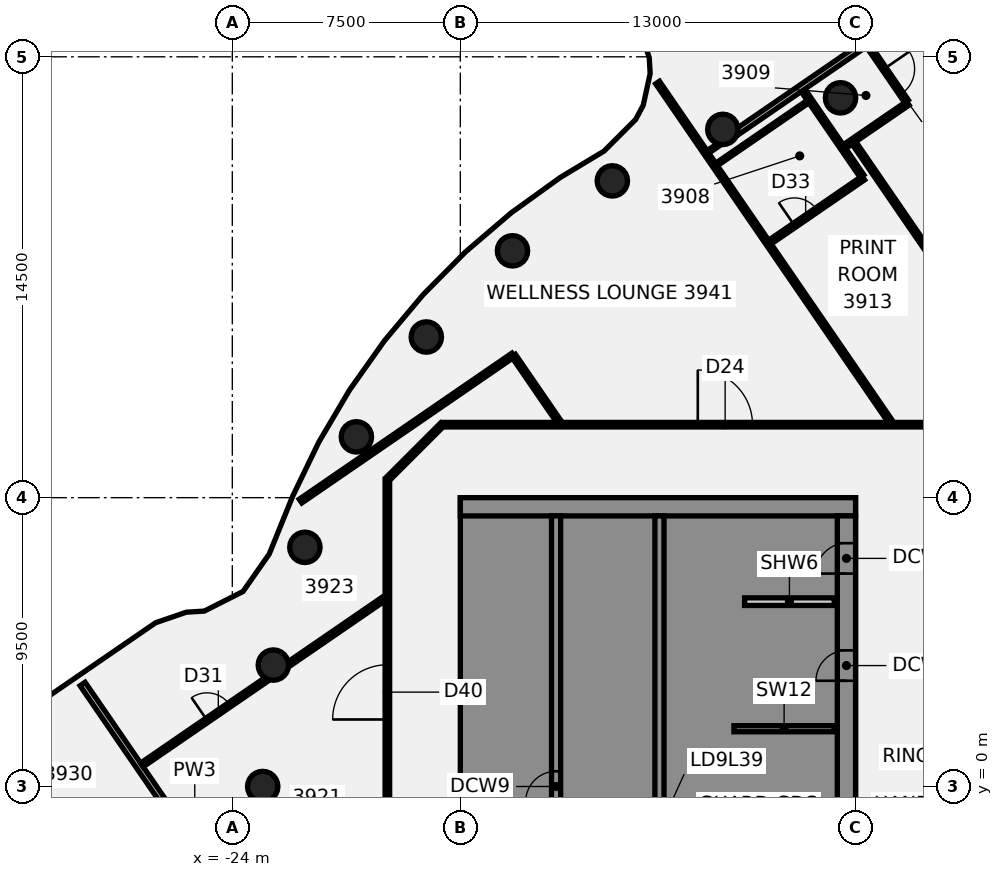
"""IFC4 building model, lengths in metres.
Left out: names, types, materials, properties, quantities, classifications, styles, units other than length and angle.
Written with IfcOpenShell. Run it as: python <this file> out.ifc"""

import sys

from ifc_helpers import new_model, si_unit, direction, frame, frame_2d, origin, origin_2d, place, context, subcontext, project, spatial, polyline, rectangle, circle, outline, extrude, element, fill, save


model = new_model("IFC4")
c1 = context("Model", 3, precision=1e-05, world=origin(), true_north=direction((0.0, 1.0)))
c2 = subcontext(c1, "Body", "Model", "MODEL_VIEW")
j1 = project(units=[si_unit("LENGTHUNIT", "METRE"), si_unit("PLANEANGLEUNIT", "RADIAN")], contexts=[c1])
p1 = place(None, origin())
s1 = spatial("IfcSite", under=j1, at=p1, CompositionType="ELEMENT")
p2 = place(p1, origin())
s2 = spatial("IfcBuilding", under=s1, at=p2, CompositionType="ELEMENT")
p3 = place(p2, frame((0.0, 0.0, 159.25)))
s3 = spatial("IfcBuildingStorey", under=s2, at=p3, CompositionType="ELEMENT", Elevation=159.25)
for number, where, z_axis, x_axis in (
    (1, (-3.994, 22.651, -0.14), (0.0, 0.0, 1.0), (1.0, 0.0, 0.0)),
    (2, (-7.866, 21.613, -0.14), (0.0, 0.0, 1.0), (1.0, 0.0, 0.0)),
    (3, (-11.5, 19.919, -0.14), (0.0, 0.0, 1.0), (1.0, 0.0, 0.0)),
    (4, (-14.784, 17.619, -0.14), (0.0, 0.0, 1.0), (1.0, 0.0, 0.0)),
    (5, (-17.619, 14.784, -0.14), (0.0, 0.0, 1.0), (1.0, 0.0, 0.0)),
    (6, (-19.919, 11.5, -0.14), (0.0, 0.0, 1.0), (1.0, 0.0, 0.0)),
    (7, (-21.613, 7.866, -0.14), (0.0, 0.0, 1.0), (1.0, 0.0, 0.0)),
    (8, (-22.651, 3.994, -0.14), (0.0, 0.0, 1.0), (1.0, 0.0, 0.0)),
    (9, (-23.0, 0.0, -0.14), (0.0, 0.0, 1.0), (1.0, 0.0, 0.0)),
):
    element("IfcColumn", number, at=place(p3, frame(where, z_axis=z_axis, x_axis=x_axis)), inside=s3, PredefinedType="COLUMN", context=c2, shape_type="SweptSolid", body=[
        extrude(circle(Radius=0.5, at=origin_2d()), origin(), (0.0, 0.0, 1.0), 3.75),
    ])
p4 = place(p3, frame((-28.925, 3.371, 0.0), z_axis=(0.0, 0.0, 1.0), x_axis=(0.566012012603, -0.82439699271, 0.0)))
e10 = element("IfcWall", 10, at=p4, inside=s3, PredefinedType="PARTITIONING", context=c2, shape_type="SweptSolid", body=[
    extrude(rectangle(XDim=13.034, YDim=0.2, at=frame_2d((6.517, 0.0))), origin(), (0.0, 0.0, 1.0), 3.01),
])
p5 = place(p4, frame((6.099, 0.0, 0.0)))
e11 = element("IfcOpeningElement", 11, at=p5, cuts=e10, PredefinedType="OPENING", context=c2, shape_type="SweptSolid", body=[
    extrude(rectangle(XDim=1.4, YDim=2.1, at=frame_2d((0.7, 1.05))), frame((0.0, 0.11, 0.0), z_axis=(0.0, -1.0, 0.0), x_axis=(1.0, 0.0, 0.0)), (0.0, 0.0, 1.0), 0.22),
])
p6 = place(p3, frame((-14.751, 14.174, 0.0), z_axis=(0.0, 0.0, 1.0), x_axis=(0.566198904707, -0.824268645715, 0.0)))
e12 = element("IfcWall", 12, at=p6, inside=s3, PredefinedType="PARTITIONING", context=c2, shape_type="SweptSolid", body=[
    extrude(rectangle(XDim=2.638, YDim=0.15, at=frame_2d((1.319, 0.0))), origin(), (0.0, 0.0, 1.0), 3.01),
])
p7 = place(p3, frame((-13.285, 39.225, 0.0), z_axis=(0.0, 0.0, 1.0), x_axis=(0.566080388425, -0.824350043271, 0.0)))
e13 = element("IfcWall", 13, at=p7, inside=s3, PredefinedType="PARTITIONING", context=c2, shape_type="SweptSolid", body=[
    extrude(rectangle(XDim=20.244, YDim=0.15, at=frame_2d((10.122, 0.0))), origin(), (0.0, 0.0, 1.0), 3.01),
])
p8 = place(p7, frame((18.95, 0.0, 0.0)))
e14 = element("IfcOpeningElement", 14, at=p8, cuts=e13, PredefinedType="OPENING", context=c2, shape_type="SweptSolid", body=[
    extrude(rectangle(XDim=1.0, YDim=2.1, at=frame_2d((0.5, 1.05))), frame((0.0, 0.085, 0.0), z_axis=(0.0, -1.0, 0.0), x_axis=(1.0, 0.0, 0.0)), (0.0, 0.0, 1.0), 0.17),
])
p9 = place(p7, frame((8.769, 0.0, 0.0)))
e15 = element("IfcOpeningElement", 15, at=p9, cuts=e13, PredefinedType="OPENING", context=c2, shape_type="SweptSolid", body=[
    extrude(rectangle(XDim=0.9, YDim=2.1, at=frame_2d((0.45, 1.05))), frame((0.0, 0.085, 0.0), z_axis=(0.0, -1.0, 0.0), x_axis=(1.0, 0.0, 0.0)), (0.0, 0.0, 1.0), 0.17),
])
p10 = place(p7, frame((2.32, 0.0, 0.0)))
e16 = element("IfcOpeningElement", 16, at=p10, cuts=e13, PredefinedType="OPENING", context=c2, shape_type="SweptSolid", body=[
    extrude(rectangle(XDim=0.9, YDim=2.1, at=frame_2d((0.45, 1.05))), frame((0.0, 0.085, 0.0), z_axis=(0.0, -1.0, 0.0), x_axis=(1.0, 0.0, 0.0)), (0.0, 0.0, 1.0), 0.17),
])
p11 = place(p3, frame((-10.012, 23.154, 0.0), z_axis=(0.0, 0.0, 1.0), x_axis=(0.566093064015, -0.824341338812, 0.0)))
e17 = element("IfcWall", 17, at=p11, inside=s3, PredefinedType="PARTITIONING", context=c2, shape_type="SweptSolid", body=[
    extrude(rectangle(XDim=13.532, YDim=0.15, at=frame_2d((6.766, 0.0))), origin(), (0.0, 0.0, 1.0), 3.01),
])
p12 = place(p3, frame((-5.227, 22.899, 0.0), z_axis=(0.0, 0.0, 1.0), x_axis=(0.566114247823, -0.824326791031, 0.0)))
e18 = element("IfcWall", 18, at=p12, inside=s3, PredefinedType="PARTITIONING", context=c2, shape_type="SweptSolid", body=[
    extrude(rectangle(XDim=3.425, YDim=0.15, at=frame_2d((1.712, 0.0))), origin(), (0.0, 0.0, 1.0), 3.01),
])
p13 = place(p3, frame((-3.55, 21.163, 0.0), z_axis=(0.0, 0.0, 1.0), x_axis=(0.566071104364, -0.824356418549, 0.0)))
e19 = element("IfcWall", 19, at=p13, inside=s3, PredefinedType="PARTITIONING", context=c2, shape_type="SweptSolid", body=[
    extrude(rectangle(XDim=11.117, YDim=0.15, at=frame_2d((5.559, 0.0))), origin(), (0.0, 0.0, 1.0), 3.01),
])
p14 = place(p13, frame((6.67, 0.0, 0.0)))
e20 = element("IfcOpeningElement", 20, at=p14, cuts=e19, PredefinedType="OPENING", context=c2, shape_type="SweptSolid", body=[
    extrude(rectangle(XDim=0.9, YDim=2.1, at=frame_2d((0.45, 1.05))), frame((0.0, 0.085, 0.0), z_axis=(0.0, -1.0, 0.0), x_axis=(1.0, 0.0, 0.0)), (0.0, 0.0, 1.0), 0.17),
])
p15 = place(p3, frame((-17.065, 11.9, 0.0), z_axis=(0.0, 0.0, 1.0), x_axis=(1.0, 0.0, 0.0)))
e21 = element("IfcWall", 21, at=p15, inside=s3, PredefinedType="PARTITIONING", context=c2, shape_type="SweptSolid", body=[
    extrude(rectangle(XDim=34.165, YDim=0.15, at=frame_2d((17.083, 0.0))), origin(), (0.0, 0.0, 1.0), 3.01),
])
p16 = place(p15, frame((22.576, 0.0, 0.0)))
e22 = element("IfcOpeningElement", 22, at=p16, cuts=e21, PredefinedType="OPENING", context=c2, shape_type="SweptSolid", body=[
    extrude(rectangle(XDim=1.8, YDim=2.1, at=frame_2d((0.9, 1.05))), frame((0.0, 0.085, 0.0), z_axis=(0.0, -1.0, 0.0), x_axis=(1.0, 0.0, 0.0)), (0.0, 0.0, 1.0), 0.17),
])
p17 = place(p15, frame((28.888, 0.0, 0.0)))
e23 = element("IfcOpeningElement", 23, at=p17, cuts=e21, PredefinedType="OPENING", context=c2, shape_type="SweptSolid", body=[
    extrude(rectangle(XDim=1.8, YDim=2.1, at=frame_2d((0.9, 1.05))), frame((0.0, 0.085, 0.0), z_axis=(0.0, -1.0, 0.0), x_axis=(1.0, 0.0, 0.0)), (0.0, 0.0, 1.0), 0.17),
])
p18 = place(p15, frame((8.376, 0.0, 0.0)))
e24 = element("IfcOpeningElement", 24, at=p18, cuts=e21, PredefinedType="OPENING", context=c2, shape_type="SweptSolid", body=[
    extrude(rectangle(XDim=1.8, YDim=2.1, at=frame_2d((0.9, 1.05))), frame((0.0, 0.085, 0.0), z_axis=(0.0, -1.0, 0.0), x_axis=(1.0, 0.0, 0.0)), (0.0, 0.0, 1.0), 0.17),
])
p19 = place(p3, frame((-26.975, 0.708, 0.0), z_axis=(0.0, 0.0, 1.0), x_axis=(0.824360979783, 0.566064461887, 0.0)))
e25 = element("IfcWall", 25, at=p19, inside=s3, PredefinedType="PARTITIONING", context=c2, shape_type="SweptSolid", body=[
    extrude(rectangle(XDim=4.999, YDim=0.15, at=frame_2d((2.5, 0.0))), origin(), (0.0, 0.0, 1.0), 3.01),
])
p20 = place(p19, frame((2.6, 0.0, 0.0)))
e26 = element("IfcOpeningElement", 26, at=p20, cuts=e25, PredefinedType="OPENING", context=c2, shape_type="SweptSolid", body=[
    extrude(rectangle(XDim=0.9, YDim=2.1, at=frame_2d((0.45, 1.05))), frame((0.0, 0.085, 0.0), z_axis=(0.0, -1.0, 0.0), x_axis=(1.0, 0.0, 0.0)), (0.0, 0.0, 1.0), 0.17),
])
p21 = place(p3, frame((-22.148, 4.023, 0.0), z_axis=(0.0, 0.0, 1.0), x_axis=(0.824392319221, 0.566018819484, 0.0)))
e27 = element("IfcWall", 27, at=p21, inside=s3, PredefinedType="PARTITIONING", context=c2, shape_type="SweptSolid", body=[
    extrude(rectangle(XDim=3.82, YDim=0.15, at=frame_2d((1.91, 0.0))), origin(), (0.0, 0.0, 1.0), 3.01),
])
p22 = place(p3, frame((-21.756, 9.387, 0.0), z_axis=(0.0, 0.0, 1.0), x_axis=(0.824352472228, 0.56607685126, 0.0)))
e28 = element("IfcWall", 28, at=p22, inside=s3, PredefinedType="PARTITIONING", context=c2, shape_type="SweptSolid", body=[
    extrude(rectangle(XDim=8.484, YDim=0.15, at=frame_2d((4.242, 0.0))), origin(), (0.0, 0.0, 1.0), 3.01),
])
p23 = place(p3, frame((-8.071, 20.46, 0.0), z_axis=(0.0, 0.0, 1.0), x_axis=(0.824324831047, 0.566117101773, 0.0)))
e29 = element("IfcWall", 29, at=p23, inside=s3, PredefinedType="PARTITIONING", context=c2, shape_type="SweptSolid", body=[
    extrude(rectangle(XDim=3.65, YDim=0.1, at=frame_2d((1.825, 0.0))), origin(), (0.0, 0.0, 1.0), 3.01),
])
p24 = place(p3, frame((-6.312, 17.908, 0.0), z_axis=(0.0, 0.0, 1.0), x_axis=(0.824306135323, 0.566144323711, 0.0)))
e30 = element("IfcWall", 30, at=p24, inside=s3, PredefinedType="PARTITIONING", context=c2, shape_type="SweptSolid", body=[
    extrude(rectangle(XDim=3.719, YDim=0.15, at=frame_2d((1.86, 0.0))), origin(), (0.0, 0.0, 1.0), 3.01),
])
p25 = place(p24, frame((0.97, 0.0, 0.0)))
e31 = element("IfcOpeningElement", 31, at=p25, cuts=e30, PredefinedType="OPENING", context=c2, shape_type="SweptSolid", body=[
    extrude(rectangle(XDim=0.9, YDim=2.1, at=frame_2d((0.45, 1.05))), frame((0.0, 0.085, 0.0), z_axis=(0.0, -1.0, 0.0), x_axis=(1.0, 0.0, 0.0)), (0.0, 0.0, 1.0), 0.17),
])
p26 = place(p3, frame((-8.354, 20.873, 0.0), z_axis=(0.0, 0.0, 1.0), x_axis=(0.824315547904, 0.566130618748, 0.0)))
e32 = element("IfcWall", 32, at=p26, inside=s3, PredefinedType="PARTITIONING", context=c2, shape_type="SweptSolid", body=[
    extrude(rectangle(XDim=0.599, YDim=0.1, at=frame_2d((0.299, 0.0))), origin(), (0.0, 0.0, 1.0), 3.01),
])
p27 = place(p3, frame((-7.49, 21.466, 0.0), z_axis=(0.0, 0.0, 1.0), x_axis=(0.824395355521, 0.566014397162, 0.0)))
e33 = element("IfcWall", 33, at=p27, inside=s3, PredefinedType="PARTITIONING", context=c2, shape_type="SweptSolid", body=[
    extrude(rectangle(XDim=13.176, YDim=0.2, at=frame_2d((6.588, 0.0))), origin(), (0.0, 0.0, 1.0), 3.01),
])
p28 = place(p27, frame((5.576, 0.0, 0.0)))
e34 = element("IfcOpeningElement", 34, at=p28, cuts=e33, PredefinedType="OPENING", context=c2, shape_type="SweptSolid", body=[
    extrude(rectangle(XDim=1.4, YDim=2.1, at=frame_2d((0.7, 1.05))), frame((0.0, 0.11, 0.0), z_axis=(0.0, -1.0, 0.0), x_axis=(1.0, 0.0, 0.0)), (0.0, 0.0, 1.0), 0.22),
])
p29 = place(p3, frame((-3.859, 21.048, 0.0), z_axis=(0.0, 0.0, 1.0), x_axis=(0.825038611489, 0.565076357276, 0.0)))
e35 = element("IfcWall", 35, at=p29, inside=s3, PredefinedType="PARTITIONING", context=c2, shape_type="SweptSolid", body=[
    extrude(rectangle(XDim=2.52, YDim=0.15, at=frame_2d((1.26, 0.0))), origin(), (0.0, 0.0, 1.0), 3.01),
])
p30 = place(p3, frame((-18.872, 10.128, 0.0), z_axis=(0.0, 0.0, 1.0), x_axis=(0.707106781187, 0.707106781187, 0.0)))
e36 = element("IfcWall", 36, at=p30, inside=s3, PredefinedType="PARTITIONING", context=c2, shape_type="SweptSolid", body=[
    extrude(rectangle(XDim=2.505, YDim=0.15, at=frame_2d((1.253, 0.0))), origin(), (0.0, 0.0, 1.0), 3.01),
])
p31 = place(p3, frame((-18.9, -10.1, 0.0), z_axis=(0.0, 0.0, 1.0), x_axis=(0.0, 1.0, 0.0)))
e37 = element("IfcWall", 37, at=p31, inside=s3, PredefinedType="PARTITIONING", context=c2, shape_type="SweptSolid", body=[
    extrude(rectangle(XDim=20.2, YDim=0.15, at=frame_2d((10.1, 0.0))), origin(), (0.0, 0.0, 1.0), 3.01),
])
p32 = place(p31, frame((12.304, 0.0, 0.0)))
e38 = element("IfcOpeningElement", 38, at=p32, cuts=e37, PredefinedType="OPENING", context=c2, shape_type="SweptSolid", body=[
    extrude(rectangle(XDim=1.8, YDim=2.1, at=frame_2d((0.9, 1.05))), frame((0.0, 0.085, 0.0), z_axis=(0.0, -1.0, 0.0), x_axis=(1.0, 0.0, 0.0)), (0.0, 0.0, 1.0), 0.17),
])
p33 = place(p31, frame((4.209, 0.0, 0.0)))
e39 = element("IfcOpeningElement", 39, at=p33, cuts=e37, PredefinedType="OPENING", context=c2, shape_type="SweptSolid", body=[
    extrude(rectangle(XDim=1.8, YDim=2.1, at=frame_2d((0.9, 1.05))), frame((0.0, 0.085, 0.0), z_axis=(0.0, -1.0, 0.0), x_axis=(1.0, 0.0, 0.0)), (0.0, 0.0, 1.0), 0.17),
])
p34 = place(p3, origin())
e40 = element("IfcWall", 40, at=p34, inside=s3, PredefinedType="SHEAR", context=c2, shape_type="SweptSolid", body=[
    extrude(outline(polyline([(-13.5, -8.125), (-15.9, -8.125), (-15.9, -5.625), (-13.5, -5.625), (-13.5, -5.375), (-15.9, -5.375), (-15.9, 5.375), (-13.5, 5.375), (-13.5, 5.625), (-15.9, 5.625), (-15.9, 8.125), (-13.5, 8.125), (-13.5, 8.9), (-15.9, 8.9), (-16.5, 8.9), (-16.5, -8.9), (-15.9, -8.9), (-13.5, -8.9), (-13.5, -8.125)])), origin(), (0.0, 0.0, 1.0), 3.61),
])
p35 = place(p3, frame((-16.5, 9.2, 0.0), z_axis=(0.0, 0.0, 1.0), x_axis=(1.0, 0.0, 0.0)))
e41 = element("IfcWall", 41, at=p35, inside=s3, PredefinedType="SHEAR", context=c2, shape_type="SweptSolid", body=[
    extrude(rectangle(XDim=13.0, YDim=0.6, at=frame_2d((6.5, 0.0))), origin(), (0.0, 0.0, 1.0), 3.61),
])
p36 = place(p3, origin())
e42 = element("IfcWall", 42, at=p36, inside=s3, PredefinedType="SHEAR", context=c2, shape_type="SweptSolid", body=[
    extrude(outline(polyline([(-9.8, -5.375), (-9.8, -5.625), (-7.5, -5.625), (-7.2, -5.625), (-7.2, 8.9), (-7.5, 8.9), (-9.8, 8.9), (-9.8, 8.125), (-7.5, 8.125), (-7.5, 5.625), (-9.8, 5.625), (-9.8, 5.375), (-7.5, 5.375), (-7.5, 2.875), (-9.8, 2.875), (-9.8, 2.625), (-7.5, 2.625), (-7.5, 0.125), (-9.8, 0.125), (-9.8, -0.125), (-7.5, -0.125), (-7.5, -2.625), (-9.8, -2.625), (-9.8, -2.875), (-7.5, -2.875), (-7.5, -5.375), (-9.8, -5.375)])), origin(), (0.0, 0.0, 1.0), 3.61),
])
p37 = place(p3, frame((-7.5, 1.9, 0.0), z_axis=(0.0, 0.0, 1.0), x_axis=(1.0, 0.0, 0.0)))
e43 = element("IfcWall", 43, at=p37, inside=s3, PredefinedType="SHEAR", context=c2, shape_type="SweptSolid", body=[
    extrude(rectangle(XDim=3.3, YDim=0.2, at=frame_2d((1.65, 0.0))), origin(), (0.0, 0.0, 1.0), 3.61),
])
p38 = place(p3, frame((-13.35, -8.9, 0.0), z_axis=(0.0, 0.0, 1.0), x_axis=(0.0, 1.0, 0.0)))
e44 = element("IfcWall", 44, at=p38, inside=s3, PredefinedType="SHEAR", context=c2, shape_type="SweptSolid", body=[
    extrude(rectangle(XDim=17.8, YDim=0.3, at=frame_2d((8.9, 0.0))), origin(), (0.0, 0.0, 1.0), 3.61),
])
p39 = place(p38, frame((1.325, 0.0, 0.0)))
e45 = element("IfcOpeningElement", 45, at=p39, cuts=e44, PredefinedType="OPENING", context=c2, shape_type="SweptSolid", body=[
    extrude(rectangle(XDim=1.4, YDim=2.1, at=frame_2d((0.7, 1.05))), frame((0.0, 0.16, 0.0), z_axis=(0.0, -1.0, 0.0), x_axis=(1.0, 0.0, 0.0)), (0.0, 0.0, 1.0), 0.32),
])
p40 = place(p38, frame((8.4, 0.0, 0.0)))
e46 = element("IfcOpeningElement", 46, at=p40, cuts=e44, PredefinedType="OPENING", context=c2, shape_type="SweptSolid", body=[
    extrude(rectangle(XDim=1.0, YDim=2.1, at=frame_2d((0.5, 1.05))), frame((0.0, 0.16, 0.0), z_axis=(0.0, -1.0, 0.0), x_axis=(1.0, 0.0, 0.0)), (0.0, 0.0, 1.0), 0.32),
])
p41 = place(p3, frame((-9.95, -8.9, 0.0), z_axis=(0.0, 0.0, 1.0), x_axis=(0.0, 1.0, 0.0)))
e47 = element("IfcWall", 47, at=p41, inside=s3, PredefinedType="SHEAR", context=c2, shape_type="SweptSolid", body=[
    extrude(rectangle(XDim=17.8, YDim=0.3, at=frame_2d((8.9, 0.0))), origin(), (0.0, 0.0, 1.0), 3.61),
])
p42 = place(p41, frame((4.175, 0.0, 0.0)))
e48 = element("IfcOpeningElement", 48, at=p42, cuts=e47, PredefinedType="OPENING", context=c2, shape_type="SweptSolid", body=[
    extrude(rectangle(XDim=1.2, YDim=2.1, at=frame_2d((0.6, 1.05))), frame((0.0, 0.16, 0.0), z_axis=(0.0, -1.0, 0.0), x_axis=(1.0, 0.0, 0.0)), (0.0, 0.0, 1.0), 0.32),
])
p43 = place(p41, frame((6.925, 0.0, 0.0)))
e49 = element("IfcOpeningElement", 49, at=p43, cuts=e47, PredefinedType="OPENING", context=c2, shape_type="SweptSolid", body=[
    extrude(rectangle(XDim=1.2, YDim=2.1, at=frame_2d((0.6, 1.05))), frame((0.0, 0.16, 0.0), z_axis=(0.0, -1.0, 0.0), x_axis=(1.0, 0.0, 0.0)), (0.0, 0.0, 1.0), 0.32),
])
p44 = place(p3, frame((-3.8, -8.9, 0.0), z_axis=(0.0, 0.0, 1.0), x_axis=(0.0, 1.0, 0.0)))
e50 = element("IfcWall", 50, at=p44, inside=s3, PredefinedType="SHEAR", context=c2, shape_type="SweptSolid", body=[
    extrude(rectangle(XDim=17.8, YDim=0.6, at=frame_2d((8.9, 0.0))), origin(), (0.0, 0.0, 1.0), 3.61),
])
p45 = place(p44, frame((1.25, 0.0, 0.0)))
e51 = element("IfcOpeningElement", 51, at=p45, cuts=e50, PredefinedType="OPENING", context=c2, shape_type="SweptSolid", body=[
    extrude(rectangle(XDim=1.8, YDim=2.1, at=frame_2d((0.9, 1.05))), frame((0.0, 0.31, 0.0), z_axis=(0.0, -1.0, 0.0), x_axis=(1.0, 0.0, 0.0)), (0.0, 0.0, 1.0), 0.62),
])
p46 = place(p44, frame((12.377, 0.0, 0.0)))
e52 = element("IfcOpeningElement", 52, at=p46, cuts=e50, PredefinedType="OPENING", context=c2, shape_type="SweptSolid", body=[
    extrude(rectangle(XDim=1.0, YDim=2.1, at=frame_2d((0.5, 1.05))), frame((0.0, 0.31, 0.0), z_axis=(0.0, -1.0, 0.0), x_axis=(1.0, 0.0, 0.0)), (0.0, 0.0, 1.0), 0.62),
])
p47 = place(p44, frame((15.903, 0.0, 0.0)))
e53 = element("IfcOpeningElement", 53, at=p47, cuts=e50, PredefinedType="OPENING", context=c2, shape_type="SweptSolid", body=[
    extrude(rectangle(XDim=1.0, YDim=2.1, at=frame_2d((0.5, 1.05))), frame((0.0, 0.31, 0.0), z_axis=(0.0, -1.0, 0.0), x_axis=(1.0, 0.0, 0.0)), (0.0, 0.0, 1.0), 0.62),
])
p48 = place(p3, frame((-7.15, 6.08, 0.0), z_axis=(0.0, 0.0, 1.0), x_axis=(1.0, 0.0, 0.0)))
e54 = element("IfcWall", 54, at=p48, inside=s3, PredefinedType="PARTITIONING", context=c2, shape_type="SweptSolid", body=[
    extrude(rectangle(XDim=2.95, YDim=0.25, at=frame_2d((1.475, 0.0))), origin(), (0.0, 0.0, 1.0), 3.61),
])
p49 = place(p8, frame((1.0, 0.0, 0.0), z_axis=(0.0, 0.0, 1.0), x_axis=(-1.0, 0.0, 0.0)))
e55 = element("IfcDoor", 55, at=p49, inside=s3, OperationType="SINGLE_SWING_RIGHT", PredefinedType="DOOR", context=c2, shape_type="SweptSolid", body=[
    extrude(rectangle(XDim=1.0, YDim=2.1, at=frame_2d((0.5, 1.05))), frame((0.0, 0.025, 0.0), z_axis=(0.0, -1.0, 0.0), x_axis=(1.0, 0.0, 0.0)), (0.0, 0.0, 1.0), 0.05),
])
fill(e14, e55)
p50 = place(p18, origin())
e56 = element("IfcDoor", 56, at=p50, inside=s3, OperationType="DOUBLE_DOOR_SINGLE_SWING", PredefinedType="DOOR", context=c2, shape_type="SweptSolid", body=[
    extrude(rectangle(XDim=1.8, YDim=2.1, at=frame_2d((0.9, 1.05))), frame((0.0, 0.025, 0.0), z_axis=(0.0, -1.0, 0.0), x_axis=(1.0, 0.0, 0.0)), (0.0, 0.0, 1.0), 0.05),
])
fill(e24, e56)
p51 = place(p20, origin())
e57 = element("IfcDoor", 57, at=p51, inside=s3, OperationType="SINGLE_SWING_LEFT", PredefinedType="DOOR", context=c2, shape_type="SweptSolid", body=[
    extrude(rectangle(XDim=0.9, YDim=2.1, at=frame_2d((0.45, 1.05))), frame((0.0, 0.025, 0.0), z_axis=(0.0, -1.0, 0.0), x_axis=(1.0, 0.0, 0.0)), (0.0, 0.0, 1.0), 0.05),
])
fill(e26, e57)
p52 = place(p25, origin())
e58 = element("IfcDoor", 58, at=p52, inside=s3, OperationType="SINGLE_SWING_RIGHT", PredefinedType="DOOR", context=c2, shape_type="SweptSolid", body=[
    extrude(rectangle(XDim=0.9, YDim=2.1, at=frame_2d((0.45, 1.05))), frame((0.0, 0.025, 0.0), z_axis=(0.0, -1.0, 0.0), x_axis=(1.0, 0.0, 0.0)), (0.0, 0.0, 1.0), 0.05),
])
fill(e31, e58)
p53 = place(p32, frame((1.8, 0.0, 0.0), z_axis=(0.0, 0.0, 1.0), x_axis=(-1.0, 0.0, 0.0)))
e59 = element("IfcDoor", 59, at=p53, inside=s3, OperationType="DOUBLE_DOOR_SINGLE_SWING", PredefinedType="DOOR", context=c2, shape_type="SweptSolid", body=[
    extrude(rectangle(XDim=1.8, YDim=2.1, at=frame_2d((0.9, 1.05))), frame((0.0, 0.025, 0.0), z_axis=(0.0, -1.0, 0.0), x_axis=(1.0, 0.0, 0.0)), (0.0, 0.0, 1.0), 0.05),
])
fill(e38, e59)
p54 = place(p46, origin())
e60 = element("IfcDoor", 60, at=p54, inside=s3, OperationType="SINGLE_SWING_LEFT", PredefinedType="DOOR", context=c2, shape_type="SweptSolid", body=[
    extrude(rectangle(XDim=1.0, YDim=2.1, at=frame_2d((0.5, 1.05))), frame((0.0, 0.275, 0.0), z_axis=(0.0, -1.0, 0.0), x_axis=(1.0, 0.0, 0.0)), (0.0, 0.0, 1.0), 0.05),
])
fill(e52, e60)
p55 = place(p47, origin())
e61 = element("IfcDoor", 61, at=p55, inside=s3, OperationType="SINGLE_SWING_LEFT", PredefinedType="DOOR", context=c2, shape_type="SweptSolid", body=[
    extrude(rectangle(XDim=1.0, YDim=2.1, at=frame_2d((0.5, 1.05))), frame((0.0, 0.275, 0.0), z_axis=(0.0, -1.0, 0.0), x_axis=(1.0, 0.0, 0.0)), (0.0, 0.0, 1.0), 0.05),
])
fill(e53, e61)
p56 = place(p40, origin())
e62 = element("IfcDoor", 62, at=p56, inside=s3, OperationType="SINGLE_SWING_LEFT", PredefinedType="DOOR", context=c2, shape_type="SweptSolid", body=[
    extrude(rectangle(XDim=1.0, YDim=2.1, at=frame_2d((0.5, 1.05))), frame((0.0, 0.025, 0.0), z_axis=(0.0, -1.0, 0.0), x_axis=(1.0, 0.0, 0.0)), (0.0, 0.0, 1.0), 0.05),
])
fill(e46, e62)
save(model, sys.argv[1])
